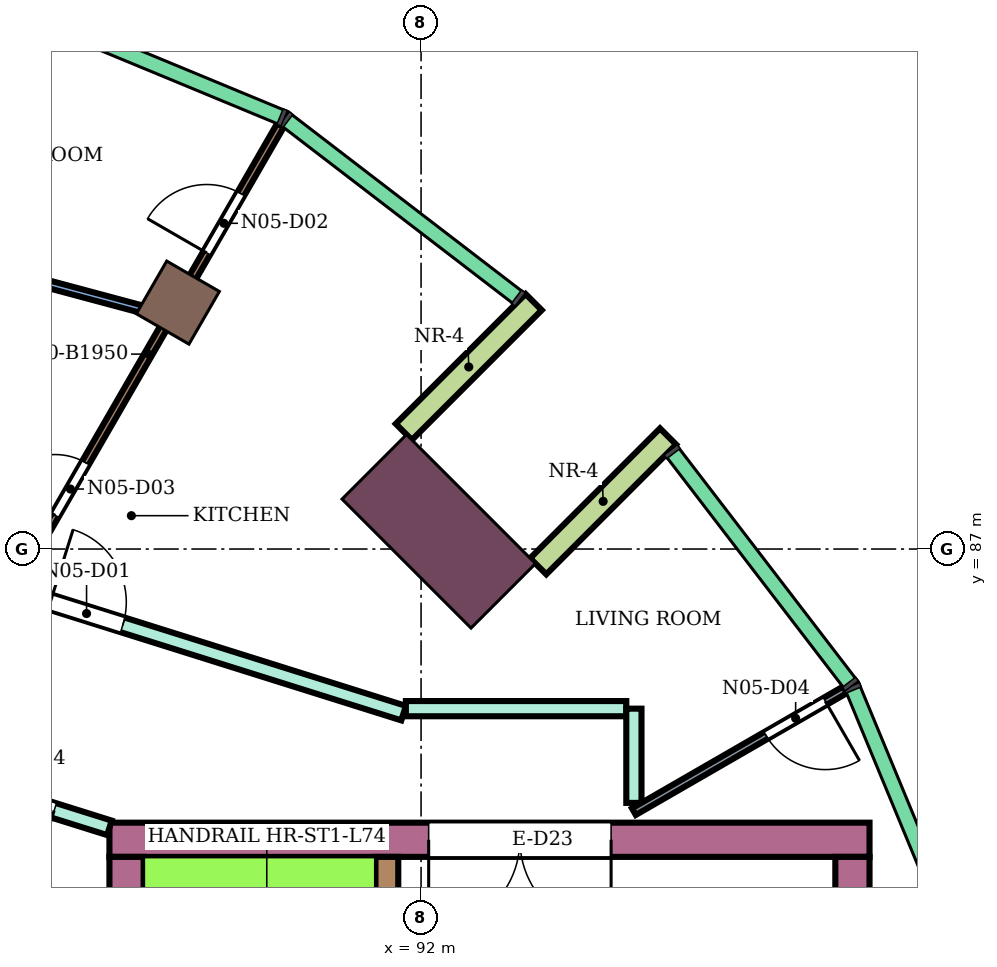
"""IFC4 building model, lengths in metres.
Left out: names, types, materials, properties, quantities, classifications, styles, units other than length and angle.
Written with IfcOpenShell. Run it as: python <this file> out.ifc"""

import sys

from ifc_helpers import new_model, si_unit, direction, frame, frame_2d, origin, origin_2d, place, context, subcontext, project, spatial, rectangle, extrude, element, fill, save


model = new_model("IFC4")
c1 = context("Model", 3, precision=1e-05, world=origin(), true_north=direction((0.0, 1.0)))
c2 = subcontext(c1, "Body", "Model", "MODEL_VIEW")
j1 = project(units=[si_unit("LENGTHUNIT", "METRE"), si_unit("PLANEANGLEUNIT", "RADIAN")], contexts=[c1])
p1 = place(None, origin())
s1 = spatial("IfcSite", under=j1, at=p1, CompositionType="ELEMENT")
p2 = place(p1, origin())
s2 = spatial("IfcBuilding", under=s1, at=p2, CompositionType="ELEMENT")
p3 = place(p2, frame((0.0, 0.0, 323.7)))
s3 = spatial("IfcBuildingStorey", under=s2, at=p3, CompositionType="ELEMENT", Elevation=323.7)
p4 = place(p3, frame((88.8, 90.242, 0.0), z_axis=(0.0, 0.0, 1.0), x_axis=(0.5, 0.866025403784, 0.0)))
e1 = element("IfcColumn", 1, at=p4, inside=s3, PredefinedType="COLUMN", context=c2, shape_type="SweptSolid", body=[
    extrude(rectangle(XDim=0.8, YDim=0.8, at=origin_2d()), origin(), (0.0, 0.0, 1.0), 4.4),
])
p5 = place(p3, frame((92.233, 87.233, 0.0), z_axis=(0.0, 0.0, 1.0), x_axis=(0.707106781187, 0.707106781187, 0.0)))
e2 = element("IfcColumn", 2, at=p5, inside=s3, PredefinedType="COLUMN", context=c2, shape_type="SweptSolid", body=[
    extrude(rectangle(XDim=1.2, YDim=2.4, at=origin_2d()), origin(), (0.0, 0.0, 1.0), 4.4),
])
p6 = place(p3, frame((87.9, 83.175, 0.0), z_axis=(0.0, 0.0, 1.0), x_axis=(1.0, 0.0, 0.0)))
e3 = element("IfcWall", 3, at=p6, inside=s3, PredefinedType="SHEAR", context=c2, shape_type="SweptSolid", body=[
    extrude(rectangle(XDim=10.0, YDim=0.45, at=frame_2d((5.0, 0.0))), origin(), (0.0, 0.0, 1.0), 4.05),
])
p7 = place(p6, frame((4.2, 0.0, 0.0)))
e4 = element("IfcOpeningElement", 4, at=p7, cuts=e3, PredefinedType="OPENING", context=c2, shape_type="SweptSolid", body=[
    extrude(rectangle(XDim=2.4, YDim=2.4, at=frame_2d((1.2, 1.2))), frame((0.0, 0.235, 0.0), z_axis=(0.0, -1.0, 0.0), x_axis=(1.0, 0.0, 0.0)), (0.0, 0.0, 1.0), 0.47),
])
p8 = place(p3, frame((88.125, 75.0, 0.0), z_axis=(0.0, 0.0, 1.0), x_axis=(0.0, 1.0, 0.0)))
e5 = element("IfcWall", 5, at=p8, inside=s3, PredefinedType="SHEAR", context=c2, shape_type="SweptSolid", body=[
    extrude(rectangle(XDim=7.95, YDim=0.45, at=frame_2d((3.975, 0.0))), origin(), (0.0, 0.0, 1.0), 4.05),
])
p9 = place(p3, frame((97.675, 73.6, 0.0), z_axis=(0.0, 0.0, 1.0), x_axis=(0.0, 1.0, 0.0)))
e6 = element("IfcWall", 6, at=p9, inside=s3, PredefinedType="SHEAR", context=c2, shape_type="SweptSolid", body=[
    extrude(rectangle(XDim=9.35, YDim=0.45, at=frame_2d((4.675, 0.0))), origin(), (0.0, 0.0, 1.0), 4.05),
])
p10 = place(p3, frame((91.55, 75.0, 0.0), z_axis=(0.0, 0.0, 1.0), x_axis=(0.0, 1.0, 0.0)))
e7 = element("IfcWall", 7, at=p10, inside=s3, PredefinedType="SHEAR", context=c2, shape_type="SweptSolid", body=[
    extrude(rectangle(XDim=7.95, YDim=0.3, at=frame_2d((3.975, 0.0))), origin(), (0.0, 0.0, 1.0), 4.05),
])
p11 = place(p10, frame((1.85, 0.0, 0.0)))
e8 = element("IfcOpeningElement", 8, at=p11, cuts=e7, PredefinedType="OPENING", context=c2, shape_type="SweptSolid", body=[
    extrude(rectangle(XDim=0.9, YDim=2.1, at=frame_2d((0.45, 1.05))), frame((0.0, 0.16, 0.0), z_axis=(0.0, -1.0, 0.0), x_axis=(1.0, 0.0, 0.0)), (0.0, 0.0, 1.0), 0.32),
])
for number, where, z_axis, x_axis in (
    (9, (93.541, 86.773, 0.0), (0.0, 0.0, 1.0), (0.707, 0.707, 0.0)),
    (10, (91.773, 88.541, 0.0), (0.0, 0.0, 1.0), (0.707, 0.707, 0.0)),
):
    element("IfcWall", number, at=place(p3, frame(where, z_axis=z_axis, x_axis=x_axis)), inside=s3, PredefinedType="NOTDEFINED", context=c2, shape_type="SweptSolid", body=[
        extrude(rectangle(XDim=2.416, YDim=0.3, at=frame_2d((1.208, 0.0))), origin(), (0.0, 0.0, 1.0), 4.4),
    ])
p12 = place(p3, frame((85.587, 84.057, 0.0), z_axis=(0.0, 0.0, 1.0), x_axis=(0.954239513179, -0.299043393987, 0.0)))
e11 = element("IfcWall", 11, at=p12, inside=s3, PredefinedType="PARTITIONING", context=c2, shape_type="SweptSolid", body=[
    extrude(rectangle(XDim=2.424, YDim=0.2, at=frame_2d((1.212, 0.0))), origin(), (0.0, 0.0, 1.0), 3.95),
])
p13 = place(p12, frame((0.762, 0.0, 0.0)))
e12 = element("IfcOpeningElement", 12, at=p13, cuts=e11, PredefinedType="OPENING", context=c2, shape_type="SweptSolid", body=[
    extrude(rectangle(XDim=0.9, YDim=2.1, at=frame_2d((0.45, 1.05))), frame((0.0, 0.11, 0.0), z_axis=(0.0, -1.0, 0.0), x_axis=(1.0, 0.0, 0.0)), (0.0, 0.0, 1.0), 0.22),
])
p14 = place(p3, frame((86.313, 86.555, 0.0), z_axis=(0.0, 0.0, 1.0), x_axis=(0.9540216201, -0.299737799389, 0.0)))
e13 = element("IfcWall", 13, at=p14, inside=s3, PredefinedType="PARTITIONING", context=c2, shape_type="SweptSolid", body=[
    extrude(rectangle(XDim=5.719, YDim=0.2, at=frame_2d((2.86, 0.0))), origin(), (0.0, 0.0, 1.0), 3.95),
])
p15 = place(p14, frame((0.848, 0.0, 0.0)))
e14 = element("IfcOpeningElement", 14, at=p15, cuts=e13, PredefinedType="OPENING", context=c2, shape_type="SweptSolid", body=[
    extrude(rectangle(XDim=1.0, YDim=2.1, at=frame_2d((0.5, 1.05))), frame((0.0, 0.11, 0.0), z_axis=(0.0, -1.0, 0.0), x_axis=(1.0, 0.0, 0.0)), (0.0, 0.0, 1.0), 0.22),
])
p16 = place(p3, frame((91.8, 84.9, 0.0), z_axis=(0.0, 0.0, 1.0), x_axis=(1.0, 0.0, 0.0)))
e15 = element("IfcWall", 15, at=p16, inside=s3, PredefinedType="PARTITIONING", context=c2, shape_type="SweptSolid", body=[
    extrude(rectangle(XDim=2.9, YDim=0.2, at=frame_2d((1.45, 0.0))), origin(), (0.0, 0.0, 1.0), 3.95),
])
p17 = place(p3, frame((94.8, 83.66, 0.0), z_axis=(0.0, 0.0, 1.0), x_axis=(0.0, 1.0, 0.0)))
e16 = element("IfcWall", 16, at=p17, inside=s3, PredefinedType="PARTITIONING", context=c2, shape_type="SweptSolid", body=[
    extrude(rectangle(XDim=1.24, YDim=0.2, at=frame_2d((0.62, 0.0))), origin(), (0.0, 0.0, 1.0), 3.95),
])
p18 = place(p3, frame((80.106, 92.359, 0.0), z_axis=(0.0, 0.0, 1.0), x_axis=(0.965889909151, -0.258953052501, 0.0)))
e17 = element("IfcWall", 17, at=p18, inside=s3, PredefinedType="PARTITIONING", context=c2, shape_type="SweptSolid", body=[
    extrude(rectangle(XDim=8.83, YDim=0.1, at=frame_2d((4.415, 0.0))), origin(), (0.0, 0.0, 1.0), 3.25),
])
p19 = place(p18, frame((3.076, 0.0, 0.0)))
e18 = element("IfcOpeningElement", 18, at=p19, cuts=e17, PredefinedType="OPENING", context=c2, shape_type="SweptSolid", body=[
    extrude(rectangle(XDim=0.9, YDim=2.1, at=frame_2d((0.45, 1.05))), frame((0.0, 0.06, 0.0), z_axis=(0.0, -1.0, 0.0), x_axis=(1.0, 0.0, 0.0)), (0.0, 0.0, 1.0), 0.12),
])
p20 = place(p3, frame((86.673, 86.553, 0.0), z_axis=(0.0, 0.0, 1.0), x_axis=(0.500103298341, 0.865965756245, 0.0)))
e19 = element("IfcWall", 19, at=p20, inside=s3, PredefinedType="PARTITIONING", context=c2, shape_type="SweptSolid", body=[
    extrude(rectangle(XDim=6.955, YDim=0.1, at=frame_2d((3.477, 0.0))), origin(), (0.0, 0.0, 1.0), 2.45),
])
p21 = place(p20, frame((5.015, 0.0, 0.0)))
e20 = element("IfcOpeningElement", 20, at=p21, cuts=e19, PredefinedType="OPENING", context=c2, shape_type="SweptSolid", body=[
    extrude(rectangle(XDim=0.9, YDim=2.1, at=frame_2d((0.45, 1.05))), frame((0.0, 0.06, 0.0), z_axis=(0.0, -1.0, 0.0), x_axis=(1.0, 0.0, 0.0)), (0.0, 0.0, 1.0), 0.12),
])
p22 = place(p20, frame((1.028, 0.0, 0.0)))
e21 = element("IfcOpeningElement", 21, at=p22, cuts=e19, PredefinedType="OPENING", context=c2, shape_type="SweptSolid", body=[
    extrude(rectangle(XDim=0.8, YDim=2.1, at=frame_2d((0.4, 1.05))), frame((0.0, 0.06, 0.0), z_axis=(0.0, -1.0, 0.0), x_axis=(1.0, 0.0, 0.0)), (0.0, 0.0, 1.0), 0.12),
])
p23 = place(p3, frame((94.8, 83.545, 0.0), z_axis=(0.0, 0.0, 1.0), x_axis=(0.866141222235, 0.499799342882, 0.0)))
e22 = element("IfcWall", 22, at=p23, inside=s3, PredefinedType="PARTITIONING", context=c2, shape_type="SweptSolid", body=[
    extrude(rectangle(XDim=3.207, YDim=0.1, at=frame_2d((1.604, 0.0))), origin(), (0.0, 0.0, 1.0), 3.95),
])
p24 = place(p23, frame((2.007, 0.0, 0.0)))
e23 = element("IfcOpeningElement", 23, at=p24, cuts=e22, PredefinedType="OPENING", context=c2, shape_type="SweptSolid", body=[
    extrude(rectangle(XDim=0.9, YDim=2.1, at=frame_2d((0.45, 1.05))), frame((0.0, 0.06, 0.0), z_axis=(0.0, -1.0, 0.0), x_axis=(1.0, 0.0, 0.0)), (0.0, 0.0, 1.0), 0.12),
])
p25 = place(p15, origin())
e24 = element("IfcDoor", 24, at=p25, inside=s3, OperationType="SINGLE_SWING_LEFT", PredefinedType="DOOR", context=c2, shape_type="SweptSolid", body=[
    extrude(rectangle(XDim=1.0, YDim=2.1, at=frame_2d((0.5, 1.05))), frame((0.0, 0.025, 0.0), z_axis=(0.0, -1.0, 0.0), x_axis=(1.0, 0.0, 0.0)), (0.0, 0.0, 1.0), 0.05),
])
fill(e14, e24)
p26 = place(p21, origin())
e25 = element("IfcDoor", 25, at=p26, inside=s3, OperationType="SINGLE_SWING_LEFT", PredefinedType="DOOR", context=c2, shape_type="SweptSolid", body=[
    extrude(rectangle(XDim=0.9, YDim=2.1, at=frame_2d((0.45, 1.05))), frame((0.0, 0.025, 0.0), z_axis=(0.0, -1.0, 0.0), x_axis=(1.0, 0.0, 0.0)), (0.0, 0.0, 1.0), 0.05),
])
fill(e20, e25)
p27 = place(p22, origin())
e26 = element("IfcDoor", 26, at=p27, inside=s3, OperationType="SINGLE_SWING_LEFT", PredefinedType="DOOR", context=c2, shape_type="SweptSolid", body=[
    extrude(rectangle(XDim=0.8, YDim=2.1, at=frame_2d((0.4, 1.05))), frame((0.0, 0.025, 0.0), z_axis=(0.0, -1.0, 0.0), x_axis=(1.0, 0.0, 0.0)), (0.0, 0.0, 1.0), 0.05),
])
fill(e21, e26)
p28 = place(p24, frame((0.9, 0.0, 0.0), z_axis=(0.0, 0.0, 1.0), x_axis=(-1.0, 0.0, 0.0)))
e27 = element("IfcDoor", 27, at=p28, inside=s3, OperationType="SINGLE_SWING_LEFT", PredefinedType="DOOR", context=c2, shape_type="SweptSolid", body=[
    extrude(rectangle(XDim=0.9, YDim=2.1, at=frame_2d((0.45, 1.05))), frame((0.0, 0.025, 0.0), z_axis=(0.0, -1.0, 0.0), x_axis=(1.0, 0.0, 0.0)), (0.0, 0.0, 1.0), 0.05),
])
fill(e23, e27)
p29 = place(p13, frame((0.9, 0.0, 0.0), z_axis=(0.0, 0.0, 1.0), x_axis=(-1.0, 0.0, 0.0)))
e28 = element("IfcDoor", 28, at=p29, inside=s3, OperationType="SINGLE_SWING_LEFT", PredefinedType="DOOR", context=c2, shape_type="SweptSolid", body=[
    extrude(rectangle(XDim=0.9, YDim=2.1, at=frame_2d((0.45, 1.05))), frame((0.0, 0.025, 0.0), z_axis=(0.0, -1.0, 0.0), x_axis=(1.0, 0.0, 0.0)), (0.0, 0.0, 1.0), 0.05),
])
fill(e12, e28)
p30 = place(p7, frame((2.4, 0.0, 0.0), z_axis=(0.0, 0.0, 1.0), x_axis=(-1.0, 0.0, 0.0)))
e29 = element("IfcDoor", 29, at=p30, inside=s3, OperationType="DOUBLE_DOOR_SINGLE_SWING", PredefinedType="DOOR", context=c2, shape_type="SweptSolid", body=[
    extrude(rectangle(XDim=2.4, YDim=2.4, at=frame_2d((1.2, 1.2))), frame((0.0, 0.025, 0.0), z_axis=(0.0, -1.0, 0.0), x_axis=(1.0, 0.0, 0.0)), (0.0, 0.0, 1.0), 0.05),
])
fill(e4, e29)
save(model, sys.argv[1])
